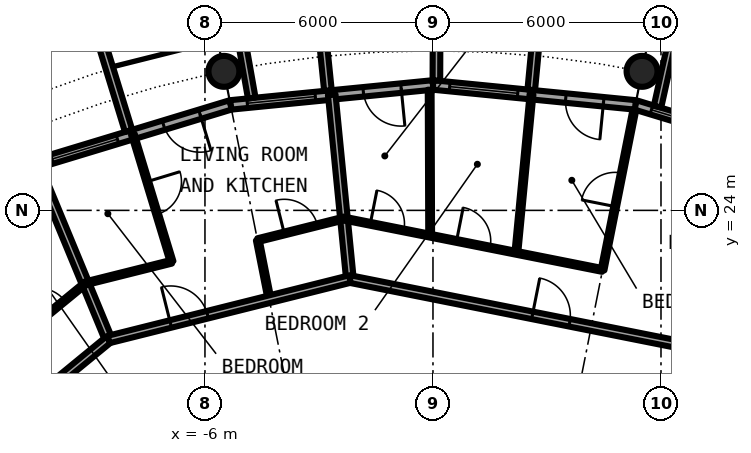
"""IFC4 building model, lengths in metres.
Left out: names, types, materials, properties, quantities, classifications, styles, units other than length and angle.
Written with IfcOpenShell. Run it as: python <this file> out.ifc"""

import sys

from ifc_helpers import new_model, si_unit, direction, frame, frame_2d, origin, origin_2d, place, context, subcontext, project, spatial, rectangle, circle, hollow_circle, extrude, element, fill, save


model = new_model("IFC4")
c1 = context("Model", 3, precision=1e-05, world=origin(), true_north=direction((0.0, 1.0)))
c2 = subcontext(c1, "Body", "Model", "MODEL_VIEW")
j1 = project(units=[si_unit("LENGTHUNIT", "METRE"), si_unit("PLANEANGLEUNIT", "RADIAN")], contexts=[c1])
p1 = place(None, origin())
s1 = spatial("IfcSite", under=j1, at=p1, CompositionType="ELEMENT")
p2 = place(p1, origin())
s2 = spatial("IfcBuilding", under=s1, at=p2, CompositionType="ELEMENT")
p3 = place(p2, frame((0.0, 0.0, 227.95)))
s3 = spatial("IfcBuildingStorey", under=s2, at=p3, CompositionType="ELEMENT", Elevation=227.95)
for number, where, z_axis, x_axis in (
    (1, (5.501, 27.658, 0.0), (0.0, 0.0, 1.0), (1.0, 0.0, 0.0)),
    (2, (-5.501, 27.658, 0.0), (0.0, 0.0, 1.0), (1.0, 0.0, 0.0)),
):
    element("IfcColumn", number, at=place(p3, frame(where, z_axis=z_axis, x_axis=x_axis)), inside=s3, PredefinedType="COLUMN", context=c2, shape_type="SweptSolid", body=[
        extrude(hollow_circle(Radius=0.406, WallThickness=0.03, at=origin_2d()), origin(), (0.0, 0.0, 1.0), 3.05),
    ])
p4 = place(p3, frame((10.447, 25.222, 0.0), z_axis=(0.0, 0.0, 1.0), x_axis=(-0.956965678721, 0.290201119486, 0.0)))
e3 = element("IfcWall", 3, at=p4, inside=s3, PredefinedType="SOLIDWALL", context=c2, shape_type="SweptSolid", body=[
    extrude(rectangle(XDim=5.351, YDim=0.25, at=frame_2d((2.676, 0.0))), origin(), (0.0, 0.0, 1.0), 2.7),
])
p5 = place(p4, frame((0.841, 0.0, 0.0)))
e4 = element("IfcOpeningElement", 4, at=p5, cuts=e3, PredefinedType="OPENING", context=c2, shape_type="SweptSolid", body=[
    extrude(rectangle(XDim=1.0, YDim=2.2, at=frame_2d((0.5, 1.1))), frame((0.0, 0.135, 0.0), z_axis=(0.0, -1.0, 0.0), x_axis=(1.0, 0.0, 0.0)), (0.0, 0.0, 1.0), 0.27),
])
p6 = place(p4, frame((3.111, 0.0, 0.3)))
e5 = element("IfcOpeningElement", 5, at=p6, cuts=e3, PredefinedType="OPENING", context=c2, shape_type="SweptSolid", body=[
    extrude(rectangle(XDim=1.8, YDim=2.1, at=frame_2d((0.9, 1.05))), frame((0.0, 0.135, 0.0), z_axis=(0.0, -1.0, 0.0), x_axis=(1.0, 0.0, 0.0)), (0.0, 0.0, 1.0), 0.27),
])
p7 = place(p3, frame((5.909, 26.729, -0.03), z_axis=(0.0, 0.0, 1.0), x_axis=(0.216409053917, 0.976302781612, 0.0)))
e6 = element("IfcWall", 6, at=p7, inside=s3, PredefinedType="SOLIDWALL", context=c2, shape_type="SweptSolid", body=[
    extrude(rectangle(XDim=2.925, YDim=0.2, at=frame_2d((1.463, 0.0))), origin(), (0.0, 0.0, 1.0), 2.73),
])
p8 = place(p3, frame((5.326, 26.775, 0.0), z_axis=(0.0, 0.0, 1.0), x_axis=(-0.995173996315, 0.098126026407, 0.0)))
e7 = element("IfcWall", 7, at=p8, inside=s3, PredefinedType="SOLIDWALL", context=c2, shape_type="SweptSolid", body=[
    extrude(rectangle(XDim=5.352, YDim=0.25, at=frame_2d((2.676, 0.0))), origin(), (0.0, 0.0, 1.0), 2.7),
])
p9 = place(p8, frame((0.841, 0.0, 0.0)))
e8 = element("IfcOpeningElement", 8, at=p9, cuts=e7, PredefinedType="OPENING", context=c2, shape_type="SweptSolid", body=[
    extrude(rectangle(XDim=1.0, YDim=2.2, at=frame_2d((0.5, 1.1))), frame((0.0, 0.135, 0.0), z_axis=(0.0, -1.0, 0.0), x_axis=(1.0, 0.0, 0.0)), (0.0, 0.0, 1.0), 0.27),
])
p10 = place(p8, frame((3.111, 0.0, 0.3)))
e9 = element("IfcOpeningElement", 9, at=p10, cuts=e7, PredefinedType="OPENING", context=c2, shape_type="SweptSolid", body=[
    extrude(rectangle(XDim=1.8, YDim=2.1, at=frame_2d((0.9, 1.05))), frame((0.0, 0.135, 0.0), z_axis=(0.0, -1.0, 0.0), x_axis=(1.0, 0.0, 0.0)), (0.0, 0.0, 1.0), 0.27),
])
p11 = place(p3, frame((2.586, 27.171, -0.03), z_axis=(0.0, 0.0, 1.0), x_axis=(0.094548432284, 0.995520262954, 0.0)))
e10 = element("IfcWall", 10, at=p11, inside=s3, PredefinedType="SOLIDWALL", context=c2, shape_type="SweptSolid", body=[
    extrude(rectangle(XDim=3.006, YDim=0.2, at=frame_2d((1.503, 0.0))), origin(), (0.0, 0.0, 1.0), 2.73),
])
p12 = place(p3, frame((0.09, 27.417, -0.03), z_axis=(0.0, 0.0, 1.0), x_axis=(0.00347308367, 0.999993968827, 0.0)))
e11 = element("IfcWall", 11, at=p12, inside=s3, PredefinedType="SOLIDWALL", context=c2, shape_type="SweptSolid", body=[
    extrude(rectangle(XDim=2.882, YDim=0.2, at=frame_2d((1.441, 0.0))), origin(), (0.0, 0.0, 1.0), 2.73),
])
p13 = place(p3, frame((0.0, 27.3, 0.0), z_axis=(0.0, 0.0, 1.0), x_axis=(-0.995173996315, -0.098126026407, 0.0)))
e12 = element("IfcWall", 12, at=p13, inside=s3, PredefinedType="SOLIDWALL", context=c2, shape_type="SweptSolid", body=[
    extrude(rectangle(XDim=5.352, YDim=0.25, at=frame_2d((2.676, 0.0))), origin(), (0.0, 0.0, 1.0), 2.7),
])
p14 = place(p13, frame((0.841, 0.0, 0.0)))
e13 = element("IfcOpeningElement", 13, at=p14, cuts=e12, PredefinedType="OPENING", context=c2, shape_type="SweptSolid", body=[
    extrude(rectangle(XDim=1.0, YDim=2.2, at=frame_2d((0.5, 1.1))), frame((0.0, 0.135, 0.0), z_axis=(0.0, -1.0, 0.0), x_axis=(1.0, 0.0, 0.0)), (0.0, 0.0, 1.0), 0.27),
])
p15 = place(p13, frame((3.111, 0.0, 0.3)))
e14 = element("IfcOpeningElement", 14, at=p15, cuts=e12, PredefinedType="OPENING", context=c2, shape_type="SweptSolid", body=[
    extrude(rectangle(XDim=1.8, YDim=2.1, at=frame_2d((0.9, 1.05))), frame((0.0, 0.135, 0.0), z_axis=(0.0, -1.0, 0.0), x_axis=(1.0, 0.0, 0.0)), (0.0, 0.0, 1.0), 0.27),
])
p16 = place(p3, frame((-2.764, 27.153, -0.03), z_axis=(0.0, 0.0, 1.0), x_axis=(-0.101505487237, 0.994834979311, 0.0)))
e15 = element("IfcWall", 15, at=p16, inside=s3, PredefinedType="SOLIDWALL", context=c2, shape_type="SweptSolid", body=[
    extrude(rectangle(XDim=3.007, YDim=0.2, at=frame_2d((1.503, 0.0))), origin(), (0.0, 0.0, 1.0), 2.73),
])
p17 = place(p3, frame((-4.769, 26.956, -0.03), z_axis=(0.0, 0.0, 1.0), x_axis=(-0.174056778901, 0.984735618183, 0.0)))
e16 = element("IfcWall", 16, at=p17, inside=s3, PredefinedType="SOLIDWALL", context=c2, shape_type="SweptSolid", body=[
    extrude(rectangle(XDim=2.925, YDim=0.2, at=frame_2d((1.462, 0.0))), origin(), (0.0, 0.0, 1.0), 2.73),
])
p18 = place(p3, frame((-5.326, 26.775, 0.0), z_axis=(0.0, 0.0, 1.0), x_axis=(-0.956965678721, -0.290201119486, 0.0)))
e17 = element("IfcWall", 17, at=p18, inside=s3, PredefinedType="SOLIDWALL", context=c2, shape_type="SweptSolid", body=[
    extrude(rectangle(XDim=5.351, YDim=0.25, at=frame_2d((2.676, 0.0))), origin(), (0.0, 0.0, 1.0), 2.7),
])
p19 = place(p18, frame((0.841, 0.0, 0.0)))
e18 = element("IfcOpeningElement", 18, at=p19, cuts=e17, PredefinedType="OPENING", context=c2, shape_type="SweptSolid", body=[
    extrude(rectangle(XDim=1.0, YDim=2.2, at=frame_2d((0.5, 1.1))), frame((0.0, 0.135, 0.0), z_axis=(0.0, -1.0, 0.0), x_axis=(1.0, 0.0, 0.0)), (0.0, 0.0, 1.0), 0.27),
])
p20 = place(p18, frame((3.111, 0.0, 0.3)))
e19 = element("IfcOpeningElement", 19, at=p20, cuts=e17, PredefinedType="OPENING", context=c2, shape_type="SweptSolid", body=[
    extrude(rectangle(XDim=1.8, YDim=2.1, at=frame_2d((0.9, 1.05))), frame((0.0, 0.135, 0.0), z_axis=(0.0, -1.0, 0.0), x_axis=(1.0, 0.0, 0.0)), (0.0, 0.0, 1.0), 0.27),
])
p21 = place(p3, frame((-8.82, 29.093, -0.03), z_axis=(0.0, 0.0, 1.0), x_axis=(-0.941461077774, -0.337121697664, 0.0)))
e20 = element("IfcWall", 20, at=p21, inside=s3, PredefinedType="SOLIDWALL", context=c2, shape_type="SweptSolid", body=[
    extrude(rectangle(XDim=2.993, YDim=0.2, at=frame_2d((1.497, 0.0))), origin(), (0.0, 0.0, 1.0), 2.73),
])
p22 = place(p21, frame((0.457, 0.0, 0.33)))
e21 = element("IfcOpeningElement", 21, at=p22, cuts=e20, PredefinedType="OPENING", context=c2, shape_type="SweptSolid", body=[
    extrude(circle(Radius=1.04, at=frame_2d((1.04, 1.04))), frame((0.0, 0.11, 0.0), z_axis=(0.0, -1.0, 0.0), x_axis=(1.0, 0.0, 0.0)), (0.0, 0.0, 1.0), 0.22),
])
p23 = place(p3, frame((-8.009, 26.092, -0.03), z_axis=(0.0, 0.0, 1.0), x_axis=(-0.293406695073, 0.955987715029, 0.0)))
e22 = element("IfcWall", 22, at=p23, inside=s3, PredefinedType="SOLIDWALL", context=c2, shape_type="SweptSolid", body=[
    extrude(rectangle(XDim=3.006, YDim=0.2, at=frame_2d((1.503, 0.0))), origin(), (0.0, 0.0, 1.0), 2.73),
])
p24 = place(p3, frame((-4.61, 23.217, 0.0), z_axis=(0.0, 0.0, 1.0), x_axis=(0.194485862594, -0.980905321247, 0.0)))
e23 = element("IfcWall", 23, at=p24, inside=s3, PredefinedType="PARTITIONING", context=c2, shape_type="SweptSolid", body=[
    extrude(rectangle(XDim=1.584, YDim=0.1, at=frame_2d((0.792, 0.0))), origin(), (0.0, 0.0, 1.0), 2.7),
])
p25 = place(p3, frame((-10.399, 25.106, 0.0), z_axis=(0.0, 0.0, 1.0), x_axis=(0.382651153718, -0.923892902104, 0.0)))
e24 = element("IfcWall", 24, at=p25, inside=s3, PredefinedType="PARTITIONING", context=c2, shape_type="SweptSolid", body=[
    extrude(rectangle(XDim=4.874, YDim=0.2, at=frame_2d((2.437, 0.0))), origin(), (0.0, 0.0, 1.0), 2.7),
])
p26 = place(p3, frame((-7.897, 26.002, 0.0), z_axis=(0.0, 0.0, 1.0), x_axis=(0.290784578865, -0.956788549625, 0.0)))
e25 = element("IfcWall", 25, at=p26, inside=s3, PredefinedType="PARTITIONING", context=c2, shape_type="SweptSolid", body=[
    extrude(rectangle(XDim=3.504, YDim=0.1, at=frame_2d((1.752, 0.0))), origin(), (0.0, 0.0, 1.0), 2.7),
])
p27 = place(p26, frame((1.302, 0.0, 0.0)))
e26 = element("IfcOpeningElement", 26, at=p27, cuts=e25, PredefinedType="OPENING", context=c2, shape_type="SweptSolid", body=[
    extrude(rectangle(XDim=0.9, YDim=2.3, at=frame_2d((0.45, 1.15))), frame((0.0, 0.06, 0.0), z_axis=(0.0, -1.0, 0.0), x_axis=(1.0, 0.0, 0.0)), (0.0, 0.0, 1.0), 0.12),
])
p28 = place(p3, frame((-2.664, 27.044, 0.0), z_axis=(0.0, 0.0, 1.0), x_axis=(0.098070432075, -0.995179476453, 0.0)))
e27 = element("IfcWall", 27, at=p28, inside=s3, PredefinedType="PARTITIONING", context=c2, shape_type="SweptSolid", body=[
    extrude(rectangle(XDim=4.874, YDim=0.2, at=frame_2d((2.437, 0.0))), origin(), (0.0, 0.0, 1.0), 2.7),
])
p29 = place(p3, frame((-0.074, 23.334, 0.0), z_axis=(0.0, 0.0, 1.0), x_axis=(-0.003368696325, 0.999994325926, 0.0)))
e28 = element("IfcWall", 28, at=p29, inside=s3, PredefinedType="PARTITIONING", context=c2, shape_type="SweptSolid", body=[
    extrude(rectangle(XDim=3.841, YDim=0.1, at=frame_2d((1.92, 0.0))), origin(), (0.0, 0.0, 1.0), 2.7),
])
p30 = place(p3, frame((2.194, 22.883, 0.0), z_axis=(0.0, 0.0, 1.0), x_axis=(0.095276864271, 0.995450812012, 0.0)))
e29 = element("IfcWall", 29, at=p30, inside=s3, PredefinedType="PARTITIONING", context=c2, shape_type="SweptSolid", body=[
    extrude(rectangle(XDim=4.187, YDim=0.1, at=frame_2d((2.094, 0.0))), origin(), (0.0, 0.0, 1.0), 2.7),
])
p31 = place(p3, frame((4.462, 22.431, 0.0), z_axis=(0.0, 0.0, 1.0), x_axis=(0.195145394338, 0.98077432423, 0.0)))
e30 = element("IfcWall", 30, at=p31, inside=s3, PredefinedType="PARTITIONING", context=c2, shape_type="SweptSolid", body=[
    extrude(rectangle(XDim=4.305, YDim=0.1, at=frame_2d((2.152, 0.0))), origin(), (0.0, 0.0, 1.0), 2.7),
])
p32 = place(p31, frame((1.702, 0.0, 0.0)))
e31 = element("IfcOpeningElement", 31, at=p32, cuts=e30, PredefinedType="OPENING", context=c2, shape_type="SweptSolid", body=[
    extrude(rectangle(XDim=0.9, YDim=2.3, at=frame_2d((0.45, 1.15))), frame((0.0, 0.06, 0.0), z_axis=(0.0, -1.0, 0.0), x_axis=(1.0, 0.0, 0.0)), (0.0, 0.0, 1.0), 0.12),
])
p33 = place(p3, frame((-18.542, 12.389, 0.0), z_axis=(0.0, 0.0, 1.0), x_axis=(0.772983503654, 0.634426121056, 0.0)))
e32 = element("IfcWall", 32, at=p33, inside=s3, PredefinedType="PARTITIONING", context=c2, shape_type="SweptSolid", body=[
    extrude(rectangle(XDim=12.947, YDim=0.2, at=frame_2d((6.474, 0.0))), origin(), (0.0, 0.0, 1.0), 2.7),
])
p34 = place(p33, frame((7.053, 0.0, 0.0)))
e33 = element("IfcOpeningElement", 33, at=p34, cuts=e32, PredefinedType="OPENING", context=c2, shape_type="SweptSolid", body=[
    extrude(rectangle(XDim=1.0, YDim=2.3, at=frame_2d((0.5, 1.15))), frame((0.0, 0.11, 0.0), z_axis=(0.0, -1.0, 0.0), x_axis=(1.0, 0.0, 0.0)), (0.0, 0.0, 1.0), 0.22),
])
p35 = place(p3, frame((-2.186, 22.193, 0.0), z_axis=(0.0, 0.0, 1.0), x_axis=(0.980780341017, -0.195115152343, 0.0)))
e34 = element("IfcWall", 34, at=p35, inside=s3, PredefinedType="PARTITIONING", context=c2, shape_type="SweptSolid", body=[
    extrude(rectangle(XDim=12.947, YDim=0.2, at=frame_2d((6.473, 0.0))), origin(), (0.0, 0.0, 1.0), 2.7),
])
p36 = place(p35, frame((4.895, 0.0, 0.0)))
e35 = element("IfcOpeningElement", 35, at=p36, cuts=e34, PredefinedType="OPENING", context=c2, shape_type="SweptSolid", body=[
    extrude(rectangle(XDim=1.0, YDim=2.3, at=frame_2d((0.5, 1.15))), frame((0.0, 0.11, 0.0), z_axis=(0.0, -1.0, 0.0), x_axis=(1.0, 0.0, 0.0)), (0.0, 0.0, 1.0), 0.22),
])
p37 = place(p3, frame((-8.534, 20.603, 0.0), z_axis=(0.0, 0.0, 1.0), x_axis=(0.97003047456, 0.242983288366, 0.0)))
e36 = element("IfcWall", 36, at=p37, inside=s3, PredefinedType="PARTITIONING", context=c2, shape_type="SweptSolid", body=[
    extrude(rectangle(XDim=6.544, YDim=0.2, at=frame_2d((3.272, 0.0))), origin(), (0.0, 0.0, 1.0), 2.7),
])
p38 = place(p37, frame((1.681, 0.0, 0.0)))
e37 = element("IfcOpeningElement", 37, at=p38, cuts=e36, PredefinedType="OPENING", context=c2, shape_type="SweptSolid", body=[
    extrude(rectangle(XDim=1.0, YDim=2.3, at=frame_2d((0.5, 1.15))), frame((0.0, 0.11, 0.0), z_axis=(0.0, -1.0, 0.0), x_axis=(1.0, 0.0, 0.0)), (0.0, 0.0, 1.0), 0.22),
])
p39 = place(p3, frame((-14.505, 17.681, 0.0), z_axis=(0.0, 0.0, 1.0), x_axis=(0.773067618794, 0.634323621484, 0.0)))
e38 = element("IfcWall", 38, at=p39, inside=s3, PredefinedType="PARTITIONING", context=c2, shape_type="SweptSolid", body=[
    extrude(rectangle(XDim=6.938, YDim=0.1, at=frame_2d((3.469, 0.0))), origin(), (0.0, 0.0, 1.0), 2.7),
])
p40 = place(p39, frame((3.016, 0.0, 0.0)))
e39 = element("IfcOpeningElement", 39, at=p40, cuts=e38, PredefinedType="OPENING", context=c2, shape_type="SweptSolid", body=[
    extrude(rectangle(XDim=0.9, YDim=2.3, at=frame_2d((0.45, 1.15))), frame((0.0, 0.06, 0.0), z_axis=(0.0, -1.0, 0.0), x_axis=(1.0, 0.0, 0.0)), (0.0, 0.0, 1.0), 0.12),
])
p41 = place(p39, frame((5.325, 0.0, 0.0)))
e40 = element("IfcOpeningElement", 40, at=p41, cuts=e38, PredefinedType="OPENING", context=c2, shape_type="SweptSolid", body=[
    extrude(rectangle(XDim=0.9, YDim=2.3, at=frame_2d((0.45, 1.15))), frame((0.0, 0.06, 0.0), z_axis=(0.0, -1.0, 0.0), x_axis=(1.0, 0.0, 0.0)), (0.0, 0.0, 1.0), 0.12),
])
p42 = place(p3, frame((-2.346, 23.785, 0.0), z_axis=(0.0, 0.0, 1.0), x_axis=(0.98080065826, -0.195012996379, 0.0)))
e41 = element("IfcWall", 41, at=p42, inside=s3, PredefinedType="PARTITIONING", context=c2, shape_type="SweptSolid", body=[
    extrude(rectangle(XDim=6.938, YDim=0.1, at=frame_2d((3.469, 0.0))), origin(), (0.0, 0.0, 1.0), 2.7),
])
p43 = place(p42, frame((3.024, 0.0, 0.0)))
e42 = element("IfcOpeningElement", 42, at=p43, cuts=e41, PredefinedType="OPENING", context=c2, shape_type="SweptSolid", body=[
    extrude(rectangle(XDim=0.9, YDim=2.3, at=frame_2d((0.45, 1.15))), frame((0.0, 0.06, 0.0), z_axis=(0.0, -1.0, 0.0), x_axis=(1.0, 0.0, 0.0)), (0.0, 0.0, 1.0), 0.12),
])
p44 = place(p42, frame((0.71, 0.0, 0.0)))
e43 = element("IfcOpeningElement", 43, at=p44, cuts=e41, PredefinedType="OPENING", context=c2, shape_type="SweptSolid", body=[
    extrude(rectangle(XDim=0.9, YDim=2.3, at=frame_2d((0.45, 1.15))), frame((0.0, 0.06, 0.0), z_axis=(0.0, -1.0, 0.0), x_axis=(1.0, 0.0, 0.0)), (0.0, 0.0, 1.0), 0.12),
])
p45 = place(p3, frame((-9.148, 22.08, 0.0), z_axis=(0.0, 0.0, 1.0), x_axis=(0.9700564467, 0.242879579658, 0.0)))
e44 = element("IfcWall", 44, at=p45, inside=s3, PredefinedType="PARTITIONING", context=c2, shape_type="SweptSolid", body=[
    extrude(rectangle(XDim=2.338, YDim=0.1, at=frame_2d((1.169, 0.0))), origin(), (0.0, 0.0, 1.0), 2.7),
])
p46 = place(p3, frame((-4.61, 23.217, 0.0), z_axis=(0.0, 0.0, 1.0), x_axis=(0.970031792706, 0.242978026043, 0.0)))
e45 = element("IfcWall", 45, at=p46, inside=s3, PredefinedType="PARTITIONING", context=c2, shape_type="SweptSolid", body=[
    extrude(rectangle(XDim=2.337, YDim=0.1, at=frame_2d((1.168, 0.0))), origin(), (0.0, 0.0, 1.0), 2.7),
])
p47 = place(p46, frame((0.719, 0.0, 0.0)))
e46 = element("IfcOpeningElement", 46, at=p47, cuts=e45, PredefinedType="OPENING", context=c2, shape_type="SweptSolid", body=[
    extrude(rectangle(XDim=0.9, YDim=2.3, at=frame_2d((0.45, 1.15))), frame((0.0, 0.06, 0.0), z_axis=(0.0, -1.0, 0.0), x_axis=(1.0, 0.0, 0.0)), (0.0, 0.0, 1.0), 0.12),
])
p48 = place(p6, origin())
e47 = element("IfcWindow", 47, at=p48, inside=s3, PartitioningType="SINGLE_PANEL", PredefinedType="WINDOW", context=c2, shape_type="SweptSolid", body=[
    extrude(rectangle(XDim=1.8, YDim=2.1, at=frame_2d((0.9, 1.05))), frame((0.0, 0.03, 0.0), z_axis=(0.0, -1.0, 0.0), x_axis=(1.0, 0.0, 0.0)), (0.0, 0.0, 1.0), 0.06),
])
fill(e5, e47)
p49 = place(p9, origin())
e48 = element("IfcDoor", 48, at=p49, inside=s3, OperationType="SINGLE_SWING_LEFT", PredefinedType="DOOR", context=c2, shape_type="SweptSolid", body=[
    extrude(rectangle(XDim=1.0, YDim=2.2, at=frame_2d((0.5, 1.1))), frame((0.0, 0.025, 0.0), z_axis=(0.0, -1.0, 0.0), x_axis=(1.0, 0.0, 0.0)), (0.0, 0.0, 1.0), 0.05),
])
fill(e8, e48)
p50 = place(p10, origin())
e49 = element("IfcWindow", 49, at=p50, inside=s3, PartitioningType="SINGLE_PANEL", PredefinedType="WINDOW", context=c2, shape_type="SweptSolid", body=[
    extrude(rectangle(XDim=1.8, YDim=2.1, at=frame_2d((0.9, 1.05))), frame((0.0, 0.03, 0.0), z_axis=(0.0, -1.0, 0.0), x_axis=(1.0, 0.0, 0.0)), (0.0, 0.0, 1.0), 0.06),
])
fill(e9, e49)
p51 = place(p14, origin())
e50 = element("IfcDoor", 50, at=p51, inside=s3, OperationType="SINGLE_SWING_LEFT", PredefinedType="DOOR", context=c2, shape_type="SweptSolid", body=[
    extrude(rectangle(XDim=1.0, YDim=2.2, at=frame_2d((0.5, 1.1))), frame((0.0, 0.025, 0.0), z_axis=(0.0, -1.0, 0.0), x_axis=(1.0, 0.0, 0.0)), (0.0, 0.0, 1.0), 0.05),
])
fill(e13, e50)
p52 = place(p15, origin())
e51 = element("IfcWindow", 51, at=p52, inside=s3, PartitioningType="SINGLE_PANEL", PredefinedType="WINDOW", context=c2, shape_type="SweptSolid", body=[
    extrude(rectangle(XDim=1.8, YDim=2.1, at=frame_2d((0.9, 1.05))), frame((0.0, 0.03, 0.0), z_axis=(0.0, -1.0, 0.0), x_axis=(1.0, 0.0, 0.0)), (0.0, 0.0, 1.0), 0.06),
])
fill(e14, e51)
p53 = place(p19, origin())
e52 = element("IfcDoor", 52, at=p53, inside=s3, OperationType="SINGLE_SWING_LEFT", PredefinedType="DOOR", context=c2, shape_type="SweptSolid", body=[
    extrude(rectangle(XDim=1.0, YDim=2.2, at=frame_2d((0.5, 1.1))), frame((0.0, 0.025, 0.0), z_axis=(0.0, -1.0, 0.0), x_axis=(1.0, 0.0, 0.0)), (0.0, 0.0, 1.0), 0.05),
])
fill(e18, e52)
p54 = place(p20, origin())
e53 = element("IfcWindow", 53, at=p54, inside=s3, PartitioningType="SINGLE_PANEL", PredefinedType="WINDOW", context=c2, shape_type="SweptSolid", body=[
    extrude(rectangle(XDim=1.8, YDim=2.1, at=frame_2d((0.9, 1.05))), frame((0.0, 0.03, 0.0), z_axis=(0.0, -1.0, 0.0), x_axis=(1.0, 0.0, 0.0)), (0.0, 0.0, 1.0), 0.06),
])
fill(e19, e53)
p55 = place(p36, origin())
e54 = element("IfcDoor", 54, at=p55, inside=s3, OperationType="SINGLE_SWING_LEFT", PredefinedType="DOOR", context=c2, shape_type="SweptSolid", body=[
    extrude(rectangle(XDim=1.0, YDim=2.3, at=frame_2d((0.5, 1.15))), frame((0.0, 0.025, 0.0), z_axis=(0.0, -1.0, 0.0), x_axis=(1.0, 0.0, 0.0)), (0.0, 0.0, 1.0), 0.05),
])
fill(e35, e54)
p56 = place(p32, origin())
e55 = element("IfcDoor", 55, at=p56, inside=s3, OperationType="SINGLE_SWING_RIGHT", PredefinedType="DOOR", context=c2, shape_type="SweptSolid", body=[
    extrude(rectangle(XDim=0.9, YDim=2.3, at=frame_2d((0.45, 1.15))), frame((0.0, 0.025, 0.0), z_axis=(0.0, -1.0, 0.0), x_axis=(1.0, 0.0, 0.0)), (0.0, 0.0, 1.0), 0.05),
])
fill(e31, e55)
p57 = place(p43, origin())
e56 = element("IfcDoor", 56, at=p57, inside=s3, OperationType="SINGLE_SWING_RIGHT", PredefinedType="DOOR", context=c2, shape_type="SweptSolid", body=[
    extrude(rectangle(XDim=0.9, YDim=2.3, at=frame_2d((0.45, 1.15))), frame((0.0, 0.025, 0.0), z_axis=(0.0, -1.0, 0.0), x_axis=(1.0, 0.0, 0.0)), (0.0, 0.0, 1.0), 0.05),
])
fill(e42, e56)
p58 = place(p44, origin())
e57 = element("IfcDoor", 57, at=p58, inside=s3, OperationType="SINGLE_SWING_LEFT", PredefinedType="DOOR", context=c2, shape_type="SweptSolid", body=[
    extrude(rectangle(XDim=0.9, YDim=2.3, at=frame_2d((0.45, 1.15))), frame((0.0, 0.025, 0.0), z_axis=(0.0, -1.0, 0.0), x_axis=(1.0, 0.0, 0.0)), (0.0, 0.0, 1.0), 0.05),
])
fill(e43, e57)
p59 = place(p38, origin())
e58 = element("IfcDoor", 58, at=p59, inside=s3, OperationType="SINGLE_SWING_LEFT", PredefinedType="DOOR", context=c2, shape_type="SweptSolid", body=[
    extrude(rectangle(XDim=1.0, YDim=2.3, at=frame_2d((0.5, 1.15))), frame((0.0, 0.025, 0.0), z_axis=(0.0, -1.0, 0.0), x_axis=(1.0, 0.0, 0.0)), (0.0, 0.0, 1.0), 0.05),
])
fill(e37, e58)
p60 = place(p47, origin())
e59 = element("IfcDoor", 59, at=p60, inside=s3, OperationType="SINGLE_SWING_LEFT", PredefinedType="DOOR", context=c2, shape_type="SweptSolid", body=[
    extrude(rectangle(XDim=0.9, YDim=2.3, at=frame_2d((0.45, 1.15))), frame((0.0, 0.025, 0.0), z_axis=(0.0, -1.0, 0.0), x_axis=(1.0, 0.0, 0.0)), (0.0, 0.0, 1.0), 0.05),
])
fill(e46, e59)
p61 = place(p27, origin())
e60 = element("IfcDoor", 60, at=p61, inside=s3, OperationType="SINGLE_SWING_RIGHT", PredefinedType="DOOR", context=c2, shape_type="SweptSolid", body=[
    extrude(rectangle(XDim=0.9, YDim=2.3, at=frame_2d((0.45, 1.15))), frame((0.0, 0.025, 0.0), z_axis=(0.0, -1.0, 0.0), x_axis=(1.0, 0.0, 0.0)), (0.0, 0.0, 1.0), 0.05),
])
fill(e26, e60)
p62 = place(p41, origin())
e61 = element("IfcDoor", 61, at=p62, inside=s3, OperationType="SINGLE_SWING_RIGHT", PredefinedType="DOOR", context=c2, shape_type="SweptSolid", body=[
    extrude(rectangle(XDim=0.9, YDim=2.3, at=frame_2d((0.45, 1.15))), frame((0.0, 0.025, 0.0), z_axis=(0.0, -1.0, 0.0), x_axis=(1.0, 0.0, 0.0)), (0.0, 0.0, 1.0), 0.05),
])
fill(e40, e61)
save(model, sys.argv[1])
